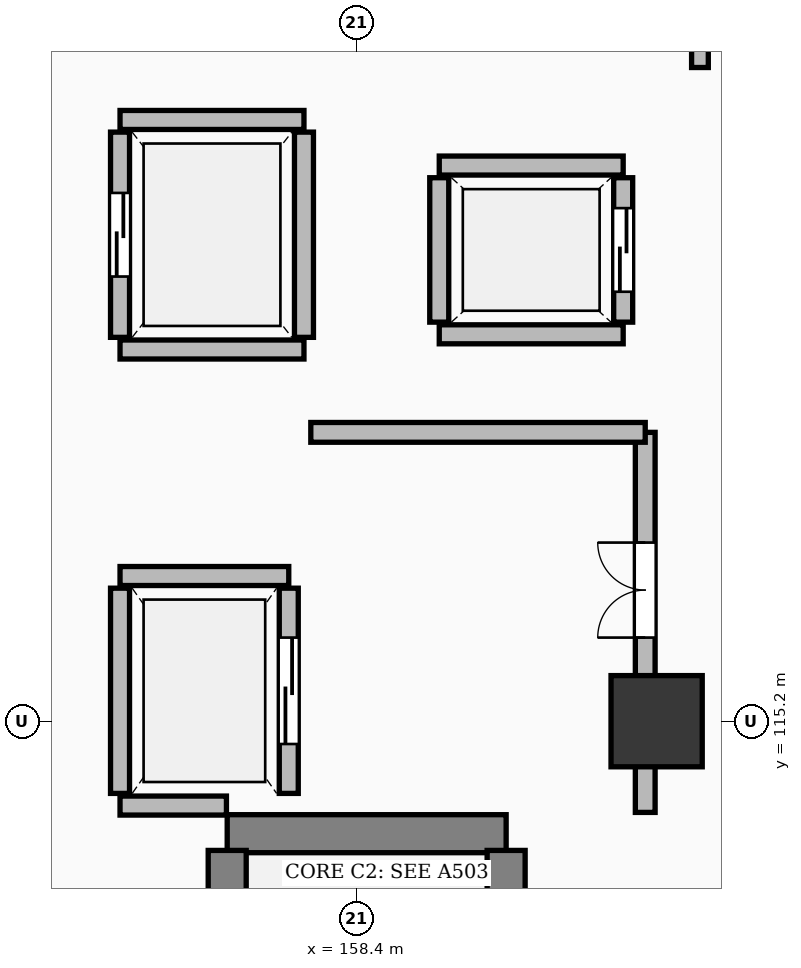
"""IFC4 building model, lengths in metres.
Left out: names, types, materials, properties, quantities, classifications, styles, units other than length and angle.
Written with IfcOpenShell. Run it as: python <this file> out.ifc"""

import sys

from ifc_helpers import new_model, si_unit, direction, frame, frame_2d, origin, origin_2d, place, context, subcontext, project, spatial, rectangle, extrude, element, fill, save


model = new_model("IFC4")
c1 = context("Model", 3, precision=1e-05, world=origin(), true_north=direction((0.0, 1.0)))
c2 = subcontext(c1, "Body", "Model", "MODEL_VIEW")
j1 = project(units=[si_unit("LENGTHUNIT", "METRE"), si_unit("PLANEANGLEUNIT", "RADIAN")], contexts=[c1])
p1 = place(None, origin())
s1 = spatial("IfcSite", under=j1, at=p1, CompositionType="ELEMENT")
p2 = place(p1, origin())
s2 = spatial("IfcBuilding", under=s1, at=p2, CompositionType="ELEMENT")
p3 = place(p2, frame((0.0, 0.0, -8.4)))
s3 = spatial("IfcBuildingStorey", under=s2, at=p3, CompositionType="ELEMENT", Elevation=-8.4)
p4 = place(p3, frame((162.35, 115.2, 0.0), z_axis=(0.0, 0.0, 1.0), x_axis=(1.0, 0.0, 0.0)))
e1 = element("IfcColumn", 1, at=p4, inside=s3, PredefinedType="COLUMN", context=c2, shape_type="SweptSolid", body=[
    extrude(rectangle(XDim=1.2, YDim=1.2, at=origin_2d()), origin(), (0.0, 0.0, 1.0), 4.2),
])
p5 = place(p3, frame((156.7, 113.72, 0.0), z_axis=(0.0, 0.0, 1.0), x_axis=(1.0, 0.0, 0.0)))
e2 = element("IfcWall", 2, at=p5, inside=s3, PredefinedType="SHEAR", context=c2, shape_type="SweptSolid", body=[
    extrude(rectangle(XDim=3.67, YDim=0.5, at=frame_2d((1.835, 0.0))), origin(), (0.0, 0.0, 1.0), 3.86),
])
p6 = place(p3, frame((156.7, 103.0, 0.0), z_axis=(0.0, 0.0, 1.0), x_axis=(0.0, 1.0, 0.0)))
e3 = element("IfcWall", 3, at=p6, inside=s3, PredefinedType="SHEAR", context=c2, shape_type="SweptSolid", body=[
    extrude(rectangle(XDim=10.5, YDim=0.5, at=frame_2d((5.25, 0.0))), origin(), (0.0, 0.0, 1.0), 3.86),
])
p7 = place(p3, frame((160.37, 103.0, 0.0), z_axis=(0.0, 0.0, 1.0), x_axis=(0.0, 1.0, 0.0)))
e4 = element("IfcWall", 4, at=p7, inside=s3, PredefinedType="SHEAR", context=c2, shape_type="SweptSolid", body=[
    extrude(rectangle(XDim=10.5, YDim=0.5, at=frame_2d((5.25, 0.0))), origin(), (0.0, 0.0, 1.0), 3.86),
])
p8 = place(p7, frame((0.45, 0.0, 0.0)))
e5 = element("IfcOpeningElement", 5, at=p8, cuts=e4, PredefinedType="OPENING", context=c2, shape_type="SweptSolid", body=[
    extrude(rectangle(XDim=1.3, YDim=2.15, at=frame_2d((0.65, 1.075))), frame((0.0, 0.262, 0.0), z_axis=(0.0, -1.0, 0.0), x_axis=(1.0, 0.0, 0.0)), (0.0, 0.0, 1.0), 0.524),
])
p9 = place(p3, frame((155.29, 114.09, 0.0), z_axis=(0.0, 0.0, 1.0), x_axis=(1.0, 0.0, 0.0)))
e6 = element("IfcWall", 6, at=p9, inside=s3, PredefinedType="SOLIDWALL", context=c2, shape_type="SweptSolid", body=[
    extrude(rectangle(XDim=1.4, YDim=0.25, at=frame_2d((0.7, 0.0))), origin(), (0.0, 0.0, 1.0), 3.86),
])
p10 = place(p3, frame((155.29, 117.11, 0.0), z_axis=(0.0, 0.0, 1.0), x_axis=(1.0, 0.0, 0.0)))
e7 = element("IfcWall", 7, at=p10, inside=s3, PredefinedType="SOLIDWALL", context=c2, shape_type="SweptSolid", body=[
    extrude(rectangle(XDim=2.22, YDim=0.25, at=frame_2d((1.11, 0.0))), origin(), (0.0, 0.0, 1.0), 3.86),
])
p11 = place(p3, frame((155.29, 114.25, 0.0), z_axis=(0.0, 0.0, 1.0), x_axis=(0.0, 1.0, 0.0)))
e8 = element("IfcWall", 8, at=p11, inside=s3, PredefinedType="SOLIDWALL", context=c2, shape_type="SweptSolid", body=[
    extrude(rectangle(XDim=2.7, YDim=0.25, at=frame_2d((1.35, 0.0))), origin(), (0.0, 0.0, 1.0), 2.972),
])
p12 = place(p3, frame((157.51, 114.25, 0.0), z_axis=(0.0, 0.0, 1.0), x_axis=(0.0, 1.0, 0.0)))
e9 = element("IfcWall", 9, at=p12, inside=s3, PredefinedType="SOLIDWALL", context=c2, shape_type="SweptSolid", body=[
    extrude(rectangle(XDim=2.7, YDim=0.25, at=frame_2d((1.35, 0.0))), origin(), (0.0, 0.0, 1.0), 2.972),
])
p13 = place(p12, frame((0.65, 0.0, 0.0)))
e10 = element("IfcOpeningElement", 10, at=p13, cuts=e9, PredefinedType="OPENING", context=c2, shape_type="SweptSolid", body=[
    extrude(rectangle(XDim=1.4, YDim=2.3, at=frame_2d((0.7, 1.15))), frame((0.0, 0.137, 0.0), z_axis=(0.0, -1.0, 0.0), x_axis=(1.0, 0.0, 0.0)), (0.0, 0.0, 1.0), 0.274),
])
for number, where, z_axis, x_axis in (
    (11, (159.49, 120.29, 0.0), (0.0, 0.0, 1.0), (1.0, 0.0, 0.0)),
    (12, (159.49, 122.51, 0.0), (0.0, 0.0, 1.0), (1.0, 0.0, 0.0)),
):
    element("IfcWall", number, at=place(p3, frame(where, z_axis=z_axis, x_axis=x_axis)), inside=s3, PredefinedType="SOLIDWALL", context=c2, shape_type="SweptSolid", body=[
        extrude(rectangle(XDim=2.42, YDim=0.25, at=frame_2d((1.21, 0.0))), origin(), (0.0, 0.0, 1.0), 3.86),
    ])
p14 = place(p3, frame((159.49, 120.45, 0.0), z_axis=(0.0, 0.0, 1.0), x_axis=(0.0, 1.0, 0.0)))
e13 = element("IfcWall", 13, at=p14, inside=s3, PredefinedType="SOLIDWALL", context=c2, shape_type="SweptSolid", body=[
    extrude(rectangle(XDim=1.9, YDim=0.25, at=frame_2d((0.95, 0.0))), origin(), (0.0, 0.0, 1.0), 3.86),
])
p15 = place(p3, frame((161.91, 120.45, 0.0), z_axis=(0.0, 0.0, 1.0), x_axis=(0.0, 1.0, 0.0)))
e14 = element("IfcWall", 14, at=p15, inside=s3, PredefinedType="SOLIDWALL", context=c2, shape_type="SweptSolid", body=[
    extrude(rectangle(XDim=1.9, YDim=0.25, at=frame_2d((0.95, 0.0))), origin(), (0.0, 0.0, 1.0), 3.86),
])
p16 = place(p15, frame((0.4, 0.0, 0.0)))
e15 = element("IfcOpeningElement", 15, at=p16, cuts=e14, PredefinedType="OPENING", context=c2, shape_type="SweptSolid", body=[
    extrude(rectangle(XDim=1.1, YDim=2.2, at=frame_2d((0.55, 1.1))), frame((0.0, 0.137, 0.0), z_axis=(0.0, -1.0, 0.0), x_axis=(1.0, 0.0, 0.0)), (0.0, 0.0, 1.0), 0.274),
])
for number, where, z_axis, x_axis in (
    (16, (155.29, 120.09, 0.0), (0.0, 0.0, 1.0), (1.0, 0.0, 0.0)),
    (17, (155.29, 123.11, 0.0), (0.0, 0.0, 1.0), (1.0, 0.0, 0.0)),
):
    element("IfcWall", number, at=place(p3, frame(where, z_axis=z_axis, x_axis=x_axis)), inside=s3, PredefinedType="SOLIDWALL", context=c2, shape_type="SweptSolid", body=[
        extrude(rectangle(XDim=2.42, YDim=0.25, at=frame_2d((1.21, 0.0))), origin(), (0.0, 0.0, 1.0), 3.86),
    ])
p17 = place(p3, frame((155.29, 120.25, 0.0), z_axis=(0.0, 0.0, 1.0), x_axis=(0.0, 1.0, 0.0)))
e18 = element("IfcWall", 18, at=p17, inside=s3, PredefinedType="SOLIDWALL", context=c2, shape_type="SweptSolid", body=[
    extrude(rectangle(XDim=2.7, YDim=0.25, at=frame_2d((1.35, 0.0))), origin(), (0.0, 0.0, 1.0), 3.86),
])
p18 = place(p17, frame((0.8, 0.0, 0.0)))
e19 = element("IfcOpeningElement", 19, at=p18, cuts=e18, PredefinedType="OPENING", context=c2, shape_type="SweptSolid", body=[
    extrude(rectangle(XDim=1.1, YDim=2.2, at=frame_2d((0.55, 1.1))), frame((0.0, 0.137, 0.0), z_axis=(0.0, -1.0, 0.0), x_axis=(1.0, 0.0, 0.0)), (0.0, 0.0, 1.0), 0.274),
])
p19 = place(p3, frame((157.71, 120.25, 0.0), z_axis=(0.0, 0.0, 1.0), x_axis=(0.0, 1.0, 0.0)))
e20 = element("IfcWall", 20, at=p19, inside=s3, PredefinedType="SOLIDWALL", context=c2, shape_type="SweptSolid", body=[
    extrude(rectangle(XDim=2.7, YDim=0.25, at=frame_2d((1.35, 0.0))), origin(), (0.0, 0.0, 1.0), 3.86),
])
p20 = place(p3, frame((162.2, 114.0, 0.0), z_axis=(0.0, 0.0, 1.0), x_axis=(0.0, 1.0, 0.0)))
e21 = element("IfcWall", 21, at=p20, inside=s3, PredefinedType="SOLIDWALL", context=c2, shape_type="SweptSolid", body=[
    extrude(rectangle(XDim=5.0, YDim=0.26, at=frame_2d((2.5, 0.0))), origin(), (0.0, 0.0, 1.0), 2.972),
])
p21 = place(p20, frame((2.3, 0.0, 0.0)))
e22 = element("IfcOpeningElement", 22, at=p21, cuts=e21, PredefinedType="OPENING", context=c2, shape_type="SweptSolid", body=[
    extrude(rectangle(XDim=1.25, YDim=2.15, at=frame_2d((0.625, 1.075))), frame((0.0, 0.142, 0.0), z_axis=(0.0, -1.0, 0.0), x_axis=(1.0, 0.0, 0.0)), (0.0, 0.0, 1.0), 0.284),
])
p22 = place(p3, frame((157.8, 119.0, 0.0), z_axis=(0.0, 0.0, 1.0), x_axis=(1.0, 0.0, 0.0)))
e23 = element("IfcWall", 23, at=p22, inside=s3, PredefinedType="SOLIDWALL", context=c2, shape_type="SweptSolid", body=[
    extrude(rectangle(XDim=4.4, YDim=0.26, at=frame_2d((2.2, 0.0))), origin(), (0.0, 0.0, 1.0), 2.972),
])
p23 = place(p3, frame((162.92, 123.8, 0.0), z_axis=(0.0, 0.0, 1.0), x_axis=(0.0, 1.0, 0.0)))
e24 = element("IfcWall", 24, at=p23, inside=s3, PredefinedType="PARTITIONING", context=c2, shape_type="SweptSolid", body=[
    extrude(rectangle(XDim=1.85, YDim=0.22, at=frame_2d((0.925, 0.0))), origin(), (0.0, 0.0, 1.0), 3.102),
])
p24 = place(p13, origin())
e25 = element("IfcDoor", 25, at=p24, inside=s3, OperationType="SLIDING_TO_LEFT", PredefinedType="DOOR", context=c2, shape_type="SweptSolid", body=[
    extrude(rectangle(XDim=1.4, YDim=2.3, at=frame_2d((0.7, 1.15))), frame((0.0, 0.025, 0.0), z_axis=(0.0, -1.0, 0.0), x_axis=(1.0, 0.0, 0.0)), (0.0, 0.0, 1.0), 0.05),
])
fill(e10, e25)
p25 = place(p16, origin())
e26 = element("IfcDoor", 26, at=p25, inside=s3, OperationType="SLIDING_TO_LEFT", PredefinedType="DOOR", context=c2, shape_type="SweptSolid", body=[
    extrude(rectangle(XDim=1.1, YDim=2.2, at=frame_2d((0.55, 1.1))), frame((0.0, 0.025, 0.0), z_axis=(0.0, -1.0, 0.0), x_axis=(1.0, 0.0, 0.0)), (0.0, 0.0, 1.0), 0.05),
])
fill(e15, e26)
p26 = place(p18, origin())
e27 = element("IfcDoor", 27, at=p26, inside=s3, OperationType="SLIDING_TO_LEFT", PredefinedType="DOOR", context=c2, shape_type="SweptSolid", body=[
    extrude(rectangle(XDim=1.1, YDim=2.2, at=frame_2d((0.55, 1.1))), frame((0.0, 0.025, 0.0), z_axis=(0.0, -1.0, 0.0), x_axis=(1.0, 0.0, 0.0)), (0.0, 0.0, 1.0), 0.05),
])
fill(e19, e27)
p27 = place(p21, origin())
e28 = element("IfcDoor", 28, at=p27, inside=s3, OperationType="DOUBLE_DOOR_SINGLE_SWING", PredefinedType="DOOR", context=c2, shape_type="SweptSolid", body=[
    extrude(rectangle(XDim=1.25, YDim=2.15, at=frame_2d((0.625, 1.075))), frame((0.0, 0.025, 0.0), z_axis=(0.0, -1.0, 0.0), x_axis=(1.0, 0.0, 0.0)), (0.0, 0.0, 1.0), 0.05),
])
fill(e22, e28)
save(model, sys.argv[1])
